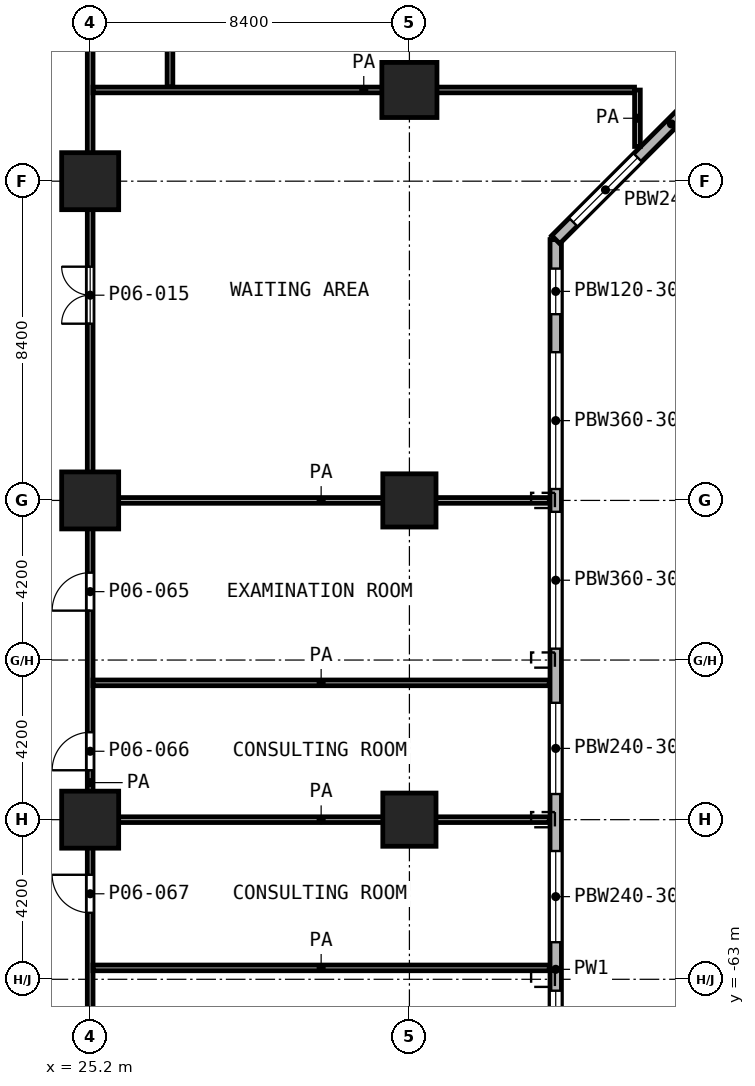
"""IFC4 building model, lengths in metres.
Left out: names, types, materials, properties, quantities, classifications, styles, units other than length and angle.
Written with IfcOpenShell. Run it as: python <this file> out.ifc"""

import sys

from ifc_helpers import new_model, si_unit, direction, frame, frame_2d, origin, origin_2d, place, context, subcontext, project, spatial, rectangle, extrude, element, fill, save


model = new_model("IFC4")
c1 = context("Model", 3, precision=1e-05, world=origin(), true_north=direction((0.0, 1.0)))
c2 = subcontext(c1, "Body", "Model", "MODEL_VIEW")
j1 = project(units=[si_unit("LENGTHUNIT", "METRE"), si_unit("PLANEANGLEUNIT", "RADIAN")], contexts=[c1])
p1 = place(None, origin())
s1 = spatial("IfcSite", under=j1, at=p1, CompositionType="ELEMENT")
p2 = place(p1, origin())
s2 = spatial("IfcBuilding", under=s1, at=p2, CompositionType="ELEMENT")
p3 = place(p2, frame((0.0, 0.0, 29.0)))
s3 = spatial("IfcBuildingStorey", under=s2, at=p3, CompositionType="ELEMENT", Elevation=29.0)
p4 = place(p3, frame((33.6, -39.6, 0.0), z_axis=(0.0, 0.0, 1.0), x_axis=(1.0, 0.0, 0.0)))
e1 = element("IfcColumn", 1, at=p4, inside=s3, PredefinedType="COLUMN", context=c2, shape_type="SweptSolid", body=[
    extrude(rectangle(XDim=1.45, YDim=1.45, at=origin_2d()), origin(), (0.0, 0.0, 1.0), 5.2),
])
for number, where, z_axis, x_axis in (
    (2, (25.2, -42.0, 0.0), (0.0, 0.0, 1.0), (1.0, 0.0, 0.0)),
    (3, (25.2, -50.4, 0.0), (0.0, 0.0, 1.0), (1.0, 0.0, 0.0)),
):
    element("IfcColumn", number, at=place(p3, frame(where, z_axis=z_axis, x_axis=x_axis)), inside=s3, PredefinedType="COLUMN", context=c2, shape_type="SweptSolid", body=[
        extrude(rectangle(XDim=1.5, YDim=1.5, at=origin_2d()), origin(), (0.0, 0.0, 1.0), 5.2),
    ])
p5 = place(p3, frame((33.6, -50.4, 0.0), z_axis=(0.0, 0.0, 1.0), x_axis=(1.0, 0.0, 0.0)))
e4 = element("IfcColumn", 4, at=p5, inside=s3, PredefinedType="COLUMN", context=c2, shape_type="SweptSolid", body=[
    extrude(rectangle(XDim=1.4, YDim=1.4, at=origin_2d()), origin(), (0.0, 0.0, 1.0), 5.2),
])
p6 = place(p3, frame((25.2, -58.8, 0.0), z_axis=(0.0, 0.0, 1.0), x_axis=(1.0, 0.0, 0.0)))
e5 = element("IfcColumn", 5, at=p6, inside=s3, PredefinedType="COLUMN", context=c2, shape_type="SweptSolid", body=[
    extrude(rectangle(XDim=1.5, YDim=1.5, at=origin_2d()), origin(), (0.0, 0.0, 1.0), 5.2),
])
p7 = place(p3, frame((33.6, -58.8, 0.0), z_axis=(0.0, 0.0, 1.0), x_axis=(1.0, 0.0, 0.0)))
e6 = element("IfcColumn", 6, at=p7, inside=s3, PredefinedType="COLUMN", context=c2, shape_type="SweptSolid", body=[
    extrude(rectangle(XDim=1.4, YDim=1.4, at=origin_2d()), origin(), (0.0, 0.0, 1.0), 5.2),
])
p8 = place(p3, frame((37.45, -81.938, 0.0), z_axis=(0.0, 0.0, 1.0), x_axis=(0.0, 1.0, 0.0)))
e7 = element("IfcWall", 7, at=p8, inside=s3, PredefinedType="SOLIDWALL", context=c2, shape_type="SweptSolid", body=[
    extrude(rectangle(XDim=38.4, YDim=0.3, at=frame_2d((19.2, 0.0))), origin(), (0.0, 0.0, 1.0), 4.7),
])
p9 = place(p8, frame((0.438, 0.0, 0.9)))
e8 = element("IfcOpeningElement", 8, at=p9, cuts=e7, PredefinedType="OPENING", context=c2, shape_type="SweptSolid", body=[
    extrude(rectangle(XDim=1.2, YDim=3.0, at=frame_2d((0.6, 1.5))), frame((0.0, 0.16, 0.0), z_axis=(0.0, -1.0, 0.0), x_axis=(1.0, 0.0, 0.0)), (0.0, 0.0, 1.0), 0.32),
])
p10 = place(p8, frame((3.263, 0.0, 0.9)))
e9 = element("IfcOpeningElement", 9, at=p10, cuts=e7, PredefinedType="OPENING", context=c2, shape_type="SweptSolid", body=[
    extrude(rectangle(XDim=2.4, YDim=3.0, at=frame_2d((1.2, 1.5))), frame((0.0, 0.16, 0.0), z_axis=(0.0, -1.0, 0.0), x_axis=(1.0, 0.0, 0.0)), (0.0, 0.0, 1.0), 0.32),
])
p11 = place(p8, frame((7.163, 0.0, 0.9)))
e10 = element("IfcOpeningElement", 10, at=p11, cuts=e7, PredefinedType="OPENING", context=c2, shape_type="SweptSolid", body=[
    extrude(rectangle(XDim=2.4, YDim=3.0, at=frame_2d((1.2, 1.5))), frame((0.0, 0.16, 0.0), z_axis=(0.0, -1.0, 0.0), x_axis=(1.0, 0.0, 0.0)), (0.0, 0.0, 1.0), 0.32),
])
p12 = place(p8, frame((10.838, 0.0, 0.9)))
e11 = element("IfcOpeningElement", 11, at=p12, cuts=e7, PredefinedType="OPENING", context=c2, shape_type="SweptSolid", body=[
    extrude(rectangle(XDim=3.6, YDim=3.0, at=frame_2d((1.8, 1.5))), frame((0.0, 0.16, 0.0), z_axis=(0.0, -1.0, 0.0), x_axis=(1.0, 0.0, 0.0)), (0.0, 0.0, 1.0), 0.32),
])
p13 = place(p8, frame((15.038, 0.0, 0.9)))
e12 = element("IfcOpeningElement", 12, at=p13, cuts=e7, PredefinedType="OPENING", context=c2, shape_type="SweptSolid", body=[
    extrude(rectangle(XDim=3.6, YDim=3.0, at=frame_2d((1.8, 1.5))), frame((0.0, 0.16, 0.0), z_axis=(0.0, -1.0, 0.0), x_axis=(1.0, 0.0, 0.0)), (0.0, 0.0, 1.0), 0.32),
])
p14 = place(p8, frame((19.913, 0.0, 0.9)))
e13 = element("IfcOpeningElement", 13, at=p14, cuts=e7, PredefinedType="OPENING", context=c2, shape_type="SweptSolid", body=[
    extrude(rectangle(XDim=2.4, YDim=3.0, at=frame_2d((1.2, 1.5))), frame((0.0, 0.16, 0.0), z_axis=(0.0, -1.0, 0.0), x_axis=(1.0, 0.0, 0.0)), (0.0, 0.0, 1.0), 0.32),
])
p15 = place(p8, frame((23.813, 0.0, 0.9)))
e14 = element("IfcOpeningElement", 14, at=p15, cuts=e7, PredefinedType="OPENING", context=c2, shape_type="SweptSolid", body=[
    extrude(rectangle(XDim=2.4, YDim=3.0, at=frame_2d((1.2, 1.5))), frame((0.0, 0.16, 0.0), z_axis=(0.0, -1.0, 0.0), x_axis=(1.0, 0.0, 0.0)), (0.0, 0.0, 1.0), 0.32),
])
p16 = place(p8, frame((27.638, 0.0, 0.9)))
e15 = element("IfcOpeningElement", 15, at=p16, cuts=e7, PredefinedType="OPENING", context=c2, shape_type="SweptSolid", body=[
    extrude(rectangle(XDim=3.6, YDim=3.0, at=frame_2d((1.8, 1.5))), frame((0.0, 0.16, 0.0), z_axis=(0.0, -1.0, 0.0), x_axis=(1.0, 0.0, 0.0)), (0.0, 0.0, 1.0), 0.32),
])
p17 = place(p8, frame((31.838, 0.0, 0.9)))
e16 = element("IfcOpeningElement", 16, at=p17, cuts=e7, PredefinedType="OPENING", context=c2, shape_type="SweptSolid", body=[
    extrude(rectangle(XDim=3.6, YDim=3.0, at=frame_2d((1.8, 1.5))), frame((0.0, 0.16, 0.0), z_axis=(0.0, -1.0, 0.0), x_axis=(1.0, 0.0, 0.0)), (0.0, 0.0, 1.0), 0.32),
])
p18 = place(p8, frame((36.438, 0.0, 0.9)))
e17 = element("IfcOpeningElement", 17, at=p18, cuts=e7, PredefinedType="OPENING", context=c2, shape_type="SweptSolid", body=[
    extrude(rectangle(XDim=1.2, YDim=3.0, at=frame_2d((0.6, 1.5))), frame((0.0, 0.16, 0.0), z_axis=(0.0, -1.0, 0.0), x_axis=(1.0, 0.0, 0.0)), (0.0, 0.0, 1.0), 0.32),
])
p19 = place(p3, frame((37.45, -43.538, 0.0), z_axis=(0.0, 0.0, 1.0), x_axis=(0.707106781187, 0.707106781187, 0.0)))
e18 = element("IfcWall", 18, at=p19, inside=s3, PredefinedType="SOLIDWALL", context=c2, shape_type="SweptSolid", body=[
    extrude(rectangle(XDim=8.61, YDim=0.3, at=frame_2d((4.305, 0.0))), origin(), (0.0, 0.0, 1.0), 4.7),
])
p20 = place(p19, frame((0.651, 0.0, 0.9)))
e19 = element("IfcOpeningElement", 19, at=p20, cuts=e18, PredefinedType="OPENING", context=c2, shape_type="SweptSolid", body=[
    extrude(rectangle(XDim=2.4, YDim=3.0, at=frame_2d((1.2, 1.5))), frame((0.0, 0.16, 0.0), z_axis=(0.0, -1.0, 0.0), x_axis=(1.0, 0.0, 0.0)), (0.0, 0.0, 1.0), 0.32),
])
p21 = place(p19, frame((5.07, 0.0, 0.9)))
e20 = element("IfcOpeningElement", 20, at=p21, cuts=e18, PredefinedType="OPENING", context=c2, shape_type="SweptSolid", body=[
    extrude(rectangle(XDim=1.2, YDim=3.0, at=frame_2d((0.6, 1.5))), frame((0.0, 0.16, 0.0), z_axis=(0.0, -1.0, 0.0), x_axis=(1.0, 0.0, 0.0)), (0.0, 0.0, 1.0), 0.32),
])
for number, where, z_axis, x_axis in (
    (21, (25.275, -62.7, 0.0), (0.0, 0.0, 1.0), (1.0, 0.0, 0.0)),
    (22, (25.275, -58.8, 0.0), (0.0, 0.0, 1.0), (1.0, 0.0, 0.0)),
    (23, (25.275, -55.2, 0.0), (0.0, 0.0, 1.0), (1.0, 0.0, 0.0)),
    (24, (25.275, -50.4, 0.0), (0.0, 0.0, 1.0), (1.0, 0.0, 0.0)),
):
    element("IfcWall", number, at=place(p3, frame(where, z_axis=z_axis, x_axis=x_axis)), inside=s3, PredefinedType="PARTITIONING", context=c2, shape_type="SweptSolid", body=[
        extrude(rectangle(XDim=12.005, YDim=0.15, at=frame_2d((6.002, 0.0))), origin(), (0.0, 0.0, 1.0), 4.7),
    ])
p22 = place(p3, frame((25.275, -39.6, 0.0), z_axis=(0.0, 0.0, 1.0), x_axis=(1.0, 0.0, 0.0)))
e25 = element("IfcWall", 25, at=p22, inside=s3, PredefinedType="PARTITIONING", context=c2, shape_type="SweptSolid", body=[
    extrude(rectangle(XDim=14.248, YDim=0.15, at=frame_2d((7.124, 0.0))), origin(), (0.0, 0.0, 1.0), 4.7),
])
p23 = place(p3, frame((25.2, -81.3, 0.0), z_axis=(0.0, 0.0, 1.0), x_axis=(0.0, 1.0, 0.0)))
e26 = element("IfcWall", 26, at=p23, inside=s3, PredefinedType="PARTITIONING", context=c2, shape_type="SweptSolid", body=[
    extrude(rectangle(XDim=46.95, YDim=0.15, at=frame_2d((23.475, 0.0))), origin(), (0.0, 0.0, 1.0), 4.7),
])
p24 = place(p23, frame((35.55, 0.0, 0.0)))
e27 = element("IfcOpeningElement", 27, at=p24, cuts=e26, PredefinedType="OPENING", context=c2, shape_type="SweptSolid", body=[
    extrude(rectangle(XDim=1.5, YDim=2.1, at=frame_2d((0.75, 1.05))), frame((0.0, 0.085, 0.0), z_axis=(0.0, -1.0, 0.0), x_axis=(1.0, 0.0, 0.0)), (0.0, 0.0, 1.0), 0.17),
])
p25 = place(p23, frame((28.0, 0.0, 0.0)))
e28 = element("IfcOpeningElement", 28, at=p25, cuts=e26, PredefinedType="OPENING", context=c2, shape_type="SweptSolid", body=[
    extrude(rectangle(XDim=1.0, YDim=2.1, at=frame_2d((0.5, 1.05))), frame((0.0, 0.085, 0.0), z_axis=(0.0, -1.0, 0.0), x_axis=(1.0, 0.0, 0.0)), (0.0, 0.0, 1.0), 0.17),
])
p26 = place(p23, frame((23.8, 0.0, 0.0)))
e29 = element("IfcOpeningElement", 29, at=p26, cuts=e26, PredefinedType="OPENING", context=c2, shape_type="SweptSolid", body=[
    extrude(rectangle(XDim=1.0, YDim=2.1, at=frame_2d((0.5, 1.05))), frame((0.0, 0.085, 0.0), z_axis=(0.0, -1.0, 0.0), x_axis=(1.0, 0.0, 0.0)), (0.0, 0.0, 1.0), 0.17),
])
p27 = place(p23, frame((20.05, 0.0, 0.0)))
e30 = element("IfcOpeningElement", 30, at=p27, cuts=e26, PredefinedType="OPENING", context=c2, shape_type="SweptSolid", body=[
    extrude(rectangle(XDim=1.0, YDim=2.1, at=frame_2d((0.5, 1.05))), frame((0.0, 0.085, 0.0), z_axis=(0.0, -1.0, 0.0), x_axis=(1.0, 0.0, 0.0)), (0.0, 0.0, 1.0), 0.17),
])
p28 = place(p23, frame((15.85, 0.0, 0.0)))
e31 = element("IfcOpeningElement", 31, at=p28, cuts=e26, PredefinedType="OPENING", context=c2, shape_type="SweptSolid", body=[
    extrude(rectangle(XDim=1.0, YDim=2.1, at=frame_2d((0.5, 1.05))), frame((0.0, 0.085, 0.0), z_axis=(0.0, -1.0, 0.0), x_axis=(1.0, 0.0, 0.0)), (0.0, 0.0, 1.0), 0.17),
])
p29 = place(p23, frame((11.35, 0.0, 0.0)))
e32 = element("IfcOpeningElement", 32, at=p29, cuts=e26, PredefinedType="OPENING", context=c2, shape_type="SweptSolid", body=[
    extrude(rectangle(XDim=1.0, YDim=2.1, at=frame_2d((0.5, 1.05))), frame((0.0, 0.085, 0.0), z_axis=(0.0, -1.0, 0.0), x_axis=(1.0, 0.0, 0.0)), (0.0, 0.0, 1.0), 0.17),
])
p30 = place(p23, frame((7.15, 0.0, 0.0)))
e33 = element("IfcOpeningElement", 33, at=p30, cuts=e26, PredefinedType="OPENING", context=c2, shape_type="SweptSolid", body=[
    extrude(rectangle(XDim=1.0, YDim=2.1, at=frame_2d((0.5, 1.05))), frame((0.0, 0.085, 0.0), z_axis=(0.0, -1.0, 0.0), x_axis=(1.0, 0.0, 0.0)), (0.0, 0.0, 1.0), 0.17),
])
p31 = place(p23, frame((3.4, 0.0, 0.0)))
e34 = element("IfcOpeningElement", 34, at=p31, cuts=e26, PredefinedType="OPENING", context=c2, shape_type="SweptSolid", body=[
    extrude(rectangle(XDim=1.0, YDim=2.1, at=frame_2d((0.5, 1.05))), frame((0.0, 0.085, 0.0), z_axis=(0.0, -1.0, 0.0), x_axis=(1.0, 0.0, 0.0)), (0.0, 0.0, 1.0), 0.17),
])
p32 = place(p3, frame((27.3, -39.525, 0.0), z_axis=(0.0, 0.0, 1.0), x_axis=(0.0, 1.0, 0.0)))
e35 = element("IfcWall", 35, at=p32, inside=s3, PredefinedType="PARTITIONING", context=c2, shape_type="SweptSolid", body=[
    extrude(rectangle(XDim=14.25, YDim=0.15, at=frame_2d((7.125, 0.0))), origin(), (0.0, 0.0, 1.0), 4.7),
])
p33 = place(p3, frame((39.6, -41.087, 0.0), z_axis=(0.0, 0.0, 1.0), x_axis=(0.0, 1.0, 0.0)))
e36 = element("IfcWall", 36, at=p33, inside=s3, PredefinedType="PARTITIONING", context=c2, shape_type="SweptSolid", body=[
    extrude(rectangle(XDim=1.485, YDim=0.15, at=frame_2d((0.742, 0.0))), origin(), (0.0, 0.0, 1.0), 4.7),
])
p34 = place(p13, origin())
e37 = element("IfcWindow", 37, at=p34, inside=s3, PartitioningType="SINGLE_PANEL", PredefinedType="WINDOW", context=c2, shape_type="SweptSolid", body=[
    extrude(rectangle(XDim=3.6, YDim=3.0, at=frame_2d((1.8, 1.5))), frame((0.0, 0.03, 0.0), z_axis=(0.0, -1.0, 0.0), x_axis=(1.0, 0.0, 0.0)), (0.0, 0.0, 1.0), 0.06),
])
fill(e12, e37)
p35 = place(p14, origin())
e38 = element("IfcWindow", 38, at=p35, inside=s3, PartitioningType="SINGLE_PANEL", PredefinedType="WINDOW", context=c2, shape_type="SweptSolid", body=[
    extrude(rectangle(XDim=2.4, YDim=3.0, at=frame_2d((1.2, 1.5))), frame((0.0, 0.03, 0.0), z_axis=(0.0, -1.0, 0.0), x_axis=(1.0, 0.0, 0.0)), (0.0, 0.0, 1.0), 0.06),
])
fill(e13, e38)
p36 = place(p15, origin())
e39 = element("IfcWindow", 39, at=p36, inside=s3, PartitioningType="SINGLE_PANEL", PredefinedType="WINDOW", context=c2, shape_type="SweptSolid", body=[
    extrude(rectangle(XDim=2.4, YDim=3.0, at=frame_2d((1.2, 1.5))), frame((0.0, 0.03, 0.0), z_axis=(0.0, -1.0, 0.0), x_axis=(1.0, 0.0, 0.0)), (0.0, 0.0, 1.0), 0.06),
])
fill(e14, e39)
p37 = place(p16, origin())
e40 = element("IfcWindow", 40, at=p37, inside=s3, PartitioningType="SINGLE_PANEL", PredefinedType="WINDOW", context=c2, shape_type="SweptSolid", body=[
    extrude(rectangle(XDim=3.6, YDim=3.0, at=frame_2d((1.8, 1.5))), frame((0.0, 0.03, 0.0), z_axis=(0.0, -1.0, 0.0), x_axis=(1.0, 0.0, 0.0)), (0.0, 0.0, 1.0), 0.06),
])
fill(e15, e40)
p38 = place(p17, origin())
e41 = element("IfcWindow", 41, at=p38, inside=s3, PartitioningType="SINGLE_PANEL", PredefinedType="WINDOW", context=c2, shape_type="SweptSolid", body=[
    extrude(rectangle(XDim=3.6, YDim=3.0, at=frame_2d((1.8, 1.5))), frame((0.0, 0.03, 0.0), z_axis=(0.0, -1.0, 0.0), x_axis=(1.0, 0.0, 0.0)), (0.0, 0.0, 1.0), 0.06),
])
fill(e16, e41)
p39 = place(p18, origin())
e42 = element("IfcWindow", 42, at=p39, inside=s3, PartitioningType="SINGLE_PANEL", PredefinedType="WINDOW", context=c2, shape_type="SweptSolid", body=[
    extrude(rectangle(XDim=1.2, YDim=3.0, at=frame_2d((0.6, 1.5))), frame((0.0, 0.03, 0.0), z_axis=(0.0, -1.0, 0.0), x_axis=(1.0, 0.0, 0.0)), (0.0, 0.0, 1.0), 0.06),
])
fill(e17, e42)
p40 = place(p20, origin())
e43 = element("IfcWindow", 43, at=p40, inside=s3, PartitioningType="SINGLE_PANEL", PredefinedType="WINDOW", context=c2, shape_type="SweptSolid", body=[
    extrude(rectangle(XDim=2.4, YDim=3.0, at=frame_2d((1.2, 1.5))), frame((0.0, 0.03, 0.0), z_axis=(0.0, -1.0, 0.0), x_axis=(1.0, 0.0, 0.0)), (0.0, 0.0, 1.0), 0.06),
])
fill(e19, e43)
p41 = place(p24, origin())
e44 = element("IfcDoor", 44, at=p41, inside=s3, OperationType="DOUBLE_DOOR_SINGLE_SWING", PredefinedType="DOOR", context=c2, shape_type="SweptSolid", body=[
    extrude(rectangle(XDim=1.5, YDim=2.1, at=frame_2d((0.75, 1.05))), frame((0.0, 0.025, 0.0), z_axis=(0.0, -1.0, 0.0), x_axis=(1.0, 0.0, 0.0)), (0.0, 0.0, 1.0), 0.05),
])
fill(e27, e44)
p42 = place(p25, origin())
e45 = element("IfcDoor", 45, at=p42, inside=s3, OperationType="SINGLE_SWING_LEFT", PredefinedType="DOOR", context=c2, shape_type="SweptSolid", body=[
    extrude(rectangle(XDim=1.0, YDim=2.1, at=frame_2d((0.5, 1.05))), frame((0.0, 0.025, 0.0), z_axis=(0.0, -1.0, 0.0), x_axis=(1.0, 0.0, 0.0)), (0.0, 0.0, 1.0), 0.05),
])
fill(e28, e45)
p43 = place(p26, origin())
e46 = element("IfcDoor", 46, at=p43, inside=s3, OperationType="SINGLE_SWING_LEFT", PredefinedType="DOOR", context=c2, shape_type="SweptSolid", body=[
    extrude(rectangle(XDim=1.0, YDim=2.1, at=frame_2d((0.5, 1.05))), frame((0.0, 0.025, 0.0), z_axis=(0.0, -1.0, 0.0), x_axis=(1.0, 0.0, 0.0)), (0.0, 0.0, 1.0), 0.05),
])
fill(e29, e46)
p44 = place(p27, origin())
e47 = element("IfcDoor", 47, at=p44, inside=s3, OperationType="SINGLE_SWING_RIGHT", PredefinedType="DOOR", context=c2, shape_type="SweptSolid", body=[
    extrude(rectangle(XDim=1.0, YDim=2.1, at=frame_2d((0.5, 1.05))), frame((0.0, 0.025, 0.0), z_axis=(0.0, -1.0, 0.0), x_axis=(1.0, 0.0, 0.0)), (0.0, 0.0, 1.0), 0.05),
])
fill(e30, e47)
save(model, sys.argv[1])
